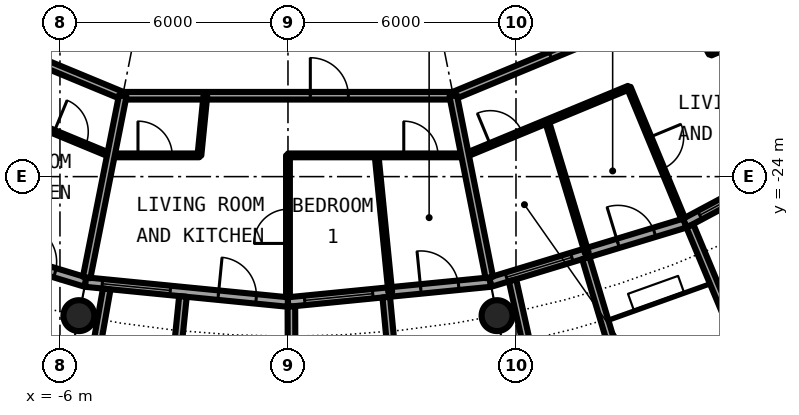
"""IFC4 building model, lengths in metres.
Left out: names, types, materials, properties, quantities, classifications, styles, units other than length and angle.
Written with IfcOpenShell. Run it as: python <this file> out.ifc"""

import sys

from ifc_helpers import new_model, si_unit, direction, frame, frame_2d, origin, origin_2d, place, context, subcontext, project, spatial, rectangle, hollow_circle, extrude, element, fill, save


model = new_model("IFC4")
c1 = context("Model", 3, precision=1e-05, world=origin(), true_north=direction((0.0, 1.0)))
c2 = subcontext(c1, "Body", "Model", "MODEL_VIEW")
j1 = project(units=[si_unit("LENGTHUNIT", "METRE"), si_unit("PLANEANGLEUNIT", "RADIAN")], contexts=[c1])
p1 = place(None, origin())
s1 = spatial("IfcSite", under=j1, at=p1, CompositionType="ELEMENT")
p2 = place(p1, origin())
s2 = spatial("IfcBuilding", under=s1, at=p2, CompositionType="ELEMENT")
p3 = place(p2, frame((0.0, 0.0, 167.7)))
s3 = spatial("IfcBuildingStorey", under=s2, at=p3, CompositionType="ELEMENT", Elevation=167.7)
for number, where, z_axis, x_axis in (
    (1, (-5.501, -27.658, 0.0), (0.0, 0.0, 1.0), (1.0, 0.0, 0.0)),
    (2, (5.501, -27.658, 0.0), (0.0, 0.0, 1.0), (1.0, 0.0, 0.0)),
):
    element("IfcColumn", number, at=place(p3, frame(where, z_axis=z_axis, x_axis=x_axis)), inside=s3, PredefinedType="COLUMN", context=c2, shape_type="SweptSolid", body=[
        extrude(hollow_circle(Radius=0.406, WallThickness=0.04, at=origin_2d()), origin(), (0.0, 0.0, 1.0), 3.05),
    ])
p4 = place(p3, frame((-10.447, -25.222, 0.0), z_axis=(0.0, 0.0, 1.0), x_axis=(0.956965678721, -0.290201119486, 0.0)))
e3 = element("IfcWall", 3, at=p4, inside=s3, PredefinedType="SOLIDWALL", context=c2, shape_type="SweptSolid", body=[
    extrude(rectangle(XDim=5.351, YDim=0.25, at=frame_2d((2.676, 0.0))), origin(), (0.0, 0.0, 1.0), 2.7),
])
p5 = place(p4, frame((0.441, 0.0, 0.3)))
e4 = element("IfcOpeningElement", 4, at=p5, cuts=e3, PredefinedType="OPENING", context=c2, shape_type="SweptSolid", body=[
    extrude(rectangle(XDim=1.8, YDim=2.1, at=frame_2d((0.9, 1.05))), frame((0.0, 0.135, 0.0), z_axis=(0.0, -1.0, 0.0), x_axis=(1.0, 0.0, 0.0)), (0.0, 0.0, 1.0), 0.27),
])
p6 = place(p4, frame((3.51, 0.0, 0.0)))
e5 = element("IfcOpeningElement", 5, at=p6, cuts=e3, PredefinedType="OPENING", context=c2, shape_type="SweptSolid", body=[
    extrude(rectangle(XDim=1.0, YDim=2.2, at=frame_2d((0.5, 1.1))), frame((0.0, 0.135, 0.0), z_axis=(0.0, -1.0, 0.0), x_axis=(1.0, 0.0, 0.0)), (0.0, 0.0, 1.0), 0.27),
])
p7 = place(p3, frame((-5.326, -26.775, 0.0), z_axis=(0.0, 0.0, 1.0), x_axis=(0.995173996315, -0.098126026407, 0.0)))
e6 = element("IfcWall", 6, at=p7, inside=s3, PredefinedType="SOLIDWALL", context=c2, shape_type="SweptSolid", body=[
    extrude(rectangle(XDim=5.352, YDim=0.25, at=frame_2d((2.676, 0.0))), origin(), (0.0, 0.0, 1.0), 2.7),
])
p8 = place(p7, frame((0.441, 0.0, 0.3)))
e7 = element("IfcOpeningElement", 7, at=p8, cuts=e6, PredefinedType="OPENING", context=c2, shape_type="SweptSolid", body=[
    extrude(rectangle(XDim=1.8, YDim=2.1, at=frame_2d((0.9, 1.05))), frame((0.0, 0.135, 0.0), z_axis=(0.0, -1.0, 0.0), x_axis=(1.0, 0.0, 0.0)), (0.0, 0.0, 1.0), 0.27),
])
p9 = place(p7, frame((3.51, 0.0, 0.0)))
e8 = element("IfcOpeningElement", 8, at=p9, cuts=e6, PredefinedType="OPENING", context=c2, shape_type="SweptSolid", body=[
    extrude(rectangle(XDim=1.0, YDim=2.2, at=frame_2d((0.5, 1.1))), frame((0.0, 0.135, 0.0), z_axis=(0.0, -1.0, 0.0), x_axis=(1.0, 0.0, 0.0)), (0.0, 0.0, 1.0), 0.27),
])
p10 = place(p3, frame((-4.769, -26.956, -0.03), z_axis=(0.0, 0.0, 1.0), x_axis=(-0.174056778901, -0.984735618183, 0.0)))
e9 = element("IfcWall", 9, at=p10, inside=s3, PredefinedType="SOLIDWALL", context=c2, shape_type="SweptSolid", body=[
    extrude(rectangle(XDim=2.925, YDim=0.2, at=frame_2d((1.462, 0.0))), origin(), (0.0, 0.0, 1.0), 2.73),
])
p11 = place(p3, frame((-2.764, -27.153, -0.03), z_axis=(0.0, 0.0, 1.0), x_axis=(-0.101505487237, -0.994834979311, 0.0)))
e10 = element("IfcWall", 10, at=p11, inside=s3, PredefinedType="SOLIDWALL", context=c2, shape_type="SweptSolid", body=[
    extrude(rectangle(XDim=3.007, YDim=0.2, at=frame_2d((1.503, 0.0))), origin(), (0.0, 0.0, 1.0), 2.73),
])
p12 = place(p3, frame((0.0, -27.3, 0.0), z_axis=(0.0, 0.0, 1.0), x_axis=(0.995173996315, 0.098126026407, 0.0)))
e11 = element("IfcWall", 11, at=p12, inside=s3, PredefinedType="SOLIDWALL", context=c2, shape_type="SweptSolid", body=[
    extrude(rectangle(XDim=5.352, YDim=0.25, at=frame_2d((2.676, 0.0))), origin(), (0.0, 0.0, 1.0), 2.7),
])
p13 = place(p12, frame((0.441, 0.0, 0.3)))
e12 = element("IfcOpeningElement", 12, at=p13, cuts=e11, PredefinedType="OPENING", context=c2, shape_type="SweptSolid", body=[
    extrude(rectangle(XDim=1.8, YDim=2.1, at=frame_2d((0.9, 1.05))), frame((0.0, 0.135, 0.0), z_axis=(0.0, -1.0, 0.0), x_axis=(1.0, 0.0, 0.0)), (0.0, 0.0, 1.0), 0.27),
])
p14 = place(p12, frame((3.51, 0.0, 0.0)))
e13 = element("IfcOpeningElement", 13, at=p14, cuts=e11, PredefinedType="OPENING", context=c2, shape_type="SweptSolid", body=[
    extrude(rectangle(XDim=1.0, YDim=2.2, at=frame_2d((0.5, 1.1))), frame((0.0, 0.135, 0.0), z_axis=(0.0, -1.0, 0.0), x_axis=(1.0, 0.0, 0.0)), (0.0, 0.0, 1.0), 0.27),
])
p15 = place(p3, frame((0.09, -27.417, -0.03), z_axis=(0.0, 0.0, 1.0), x_axis=(0.00347308367, -0.999993968827, 0.0)))
e14 = element("IfcWall", 14, at=p15, inside=s3, PredefinedType="SOLIDWALL", context=c2, shape_type="SweptSolid", body=[
    extrude(rectangle(XDim=2.882, YDim=0.2, at=frame_2d((1.441, 0.0))), origin(), (0.0, 0.0, 1.0), 2.73),
])
p16 = place(p3, frame((2.586, -27.171, -0.03), z_axis=(0.0, 0.0, 1.0), x_axis=(0.094548432284, -0.995520262954, 0.0)))
e15 = element("IfcWall", 15, at=p16, inside=s3, PredefinedType="SOLIDWALL", context=c2, shape_type="SweptSolid", body=[
    extrude(rectangle(XDim=3.006, YDim=0.2, at=frame_2d((1.503, 0.0))), origin(), (0.0, 0.0, 1.0), 2.73),
])
p17 = place(p3, frame((5.326, -26.775, 0.0), z_axis=(0.0, 0.0, 1.0), x_axis=(0.956965678721, 0.290201119486, 0.0)))
e16 = element("IfcWall", 16, at=p17, inside=s3, PredefinedType="SOLIDWALL", context=c2, shape_type="SweptSolid", body=[
    extrude(rectangle(XDim=5.351, YDim=0.25, at=frame_2d((2.676, 0.0))), origin(), (0.0, 0.0, 1.0), 2.7),
])
p18 = place(p17, frame((0.441, 0.0, 0.3)))
e17 = element("IfcOpeningElement", 17, at=p18, cuts=e16, PredefinedType="OPENING", context=c2, shape_type="SweptSolid", body=[
    extrude(rectangle(XDim=1.8, YDim=2.1, at=frame_2d((0.9, 1.05))), frame((0.0, 0.135, 0.0), z_axis=(0.0, -1.0, 0.0), x_axis=(1.0, 0.0, 0.0)), (0.0, 0.0, 1.0), 0.27),
])
p19 = place(p17, frame((3.51, 0.0, 0.0)))
e18 = element("IfcOpeningElement", 18, at=p19, cuts=e16, PredefinedType="OPENING", context=c2, shape_type="SweptSolid", body=[
    extrude(rectangle(XDim=1.0, YDim=2.2, at=frame_2d((0.5, 1.1))), frame((0.0, 0.135, 0.0), z_axis=(0.0, -1.0, 0.0), x_axis=(1.0, 0.0, 0.0)), (0.0, 0.0, 1.0), 0.27),
])
p20 = place(p3, frame((5.909, -26.729, -0.03), z_axis=(0.0, 0.0, 1.0), x_axis=(0.216409053917, -0.976302781612, 0.0)))
e19 = element("IfcWall", 19, at=p20, inside=s3, PredefinedType="SOLIDWALL", context=c2, shape_type="SweptSolid", body=[
    extrude(rectangle(XDim=2.925, YDim=0.2, at=frame_2d((1.463, 0.0))), origin(), (0.0, 0.0, 1.0), 2.73),
])
p21 = place(p3, frame((7.837, -26.144, -0.03), z_axis=(0.0, 0.0, 1.0), x_axis=(0.287064767992, -0.957911174889, 0.0)))
e20 = element("IfcWall", 20, at=p21, inside=s3, PredefinedType="SOLIDWALL", context=c2, shape_type="SweptSolid", body=[
    extrude(rectangle(XDim=3.006, YDim=0.2, at=frame_2d((1.503, 0.0))), origin(), (0.0, 0.0, 1.0), 2.73),
])
p22 = place(p3, frame((10.447, -25.222, 0.0), z_axis=(0.0, 0.0, 1.0), x_axis=(0.881915646801, 0.471407246368, 0.0)))
e21 = element("IfcWall", 21, at=p22, inside=s3, PredefinedType="SOLIDWALL", context=c2, shape_type="SweptSolid", body=[
    extrude(rectangle(XDim=5.352, YDim=0.25, at=frame_2d((2.676, 0.0))), origin(), (0.0, 0.0, 1.0), 2.7),
])
p23 = place(p22, frame((0.441, 0.0, 0.3)))
e22 = element("IfcOpeningElement", 22, at=p23, cuts=e21, PredefinedType="OPENING", context=c2, shape_type="SweptSolid", body=[
    extrude(rectangle(XDim=1.8, YDim=2.1, at=frame_2d((0.9, 1.05))), frame((0.0, 0.135, 0.0), z_axis=(0.0, -1.0, 0.0), x_axis=(1.0, 0.0, 0.0)), (0.0, 0.0, 1.0), 0.27),
])
p24 = place(p22, frame((3.51, 0.0, 0.0)))
e23 = element("IfcOpeningElement", 23, at=p24, cuts=e21, PredefinedType="OPENING", context=c2, shape_type="SweptSolid", body=[
    extrude(rectangle(XDim=1.0, YDim=2.2, at=frame_2d((0.5, 1.1))), frame((0.0, 0.135, 0.0), z_axis=(0.0, -1.0, 0.0), x_axis=(1.0, 0.0, 0.0)), (0.0, 0.0, 1.0), 0.27),
])
p25 = place(p3, frame((10.575, -25.295, -0.03), z_axis=(0.0, 0.0, 1.0), x_axis=(0.385697364644, -0.922625353492, 0.0)))
e24 = element("IfcWall", 24, at=p25, inside=s3, PredefinedType="SOLIDWALL", context=c2, shape_type="SweptSolid", body=[
    extrude(rectangle(XDim=2.883, YDim=0.2, at=frame_2d((1.442, 0.0))), origin(), (0.0, 0.0, 1.0), 2.73),
])
p26 = place(p3, frame((-6.817, -22.549, 0.0), z_axis=(0.0, 0.0, 1.0), x_axis=(0.923923664861, -0.382576870068, 0.0)))
e25 = element("IfcWall", 25, at=p26, inside=s3, PredefinedType="PARTITIONING", context=c2, shape_type="SweptSolid", body=[
    extrude(rectangle(XDim=2.331, YDim=0.1, at=frame_2d((1.166, 0.0))), origin(), (0.0, 0.0, 1.0), 2.7),
])
p27 = place(p26, frame((0.716, 0.0, 0.0)))
e26 = element("IfcOpeningElement", 26, at=p27, cuts=e25, PredefinedType="OPENING", context=c2, shape_type="SweptSolid", body=[
    extrude(rectangle(XDim=0.9, YDim=2.3, at=frame_2d((0.45, 1.15))), frame((0.0, 0.06, 0.0), z_axis=(0.0, -1.0, 0.0), x_axis=(1.0, 0.0, 0.0)), (0.0, 0.0, 1.0), 0.12),
])
p28 = place(p3, frame((-4.663, -23.441, 0.0), z_axis=(0.0, 0.0, 1.0), x_axis=(1.0, 0.0, 0.0)))
e27 = element("IfcWall", 27, at=p28, inside=s3, PredefinedType="PARTITIONING", context=c2, shape_type="SweptSolid", body=[
    extrude(rectangle(XDim=2.332, YDim=0.1, at=frame_2d((1.166, 0.0))), origin(), (0.0, 0.0, 1.0), 2.7),
])
p29 = place(p28, frame((0.716, 0.0, 0.0)))
e28 = element("IfcOpeningElement", 28, at=p29, cuts=e27, PredefinedType="OPENING", context=c2, shape_type="SweptSolid", body=[
    extrude(rectangle(XDim=0.9, YDim=2.3, at=frame_2d((0.45, 1.15))), frame((0.0, 0.06, 0.0), z_axis=(0.0, -1.0, 0.0), x_axis=(1.0, 0.0, 0.0)), (0.0, 0.0, 1.0), 0.12),
])
p30 = place(p3, frame((0.0, -23.441, 0.0), z_axis=(0.0, 0.0, 1.0), x_axis=(1.0, 0.0, 0.0)))
e29 = element("IfcWall", 29, at=p30, inside=s3, PredefinedType="PARTITIONING", context=c2, shape_type="SweptSolid", body=[
    extrude(rectangle(XDim=4.663, YDim=0.1, at=frame_2d((2.332, 0.0))), origin(), (0.0, 0.0, 1.0), 2.7),
])
p31 = place(p30, frame((3.047, 0.0, 0.0)))
e30 = element("IfcOpeningElement", 30, at=p31, cuts=e29, PredefinedType="OPENING", context=c2, shape_type="SweptSolid", body=[
    extrude(rectangle(XDim=0.9, YDim=2.3, at=frame_2d((0.45, 1.15))), frame((0.0, 0.06, 0.0), z_axis=(0.0, -1.0, 0.0), x_axis=(1.0, 0.0, 0.0)), (0.0, 0.0, 1.0), 0.12),
])
p32 = place(p3, frame((4.656, -23.442, 0.0), z_axis=(0.0, 0.0, 1.0), x_axis=(0.923994503548, 0.382405749712, 0.0)))
e31 = element("IfcWall", 31, at=p32, inside=s3, PredefinedType="PARTITIONING", context=c2, shape_type="SweptSolid", body=[
    extrude(rectangle(XDim=4.663, YDim=0.1, at=frame_2d((2.331, 0.0))), origin(), (0.0, 0.0, 1.0), 2.7),
])
p33 = place(p32, frame((0.726, 0.0, 0.0)))
e32 = element("IfcOpeningElement", 32, at=p33, cuts=e31, PredefinedType="OPENING", context=c2, shape_type="SweptSolid", body=[
    extrude(rectangle(XDim=0.9, YDim=2.3, at=frame_2d((0.45, 1.15))), frame((0.0, 0.06, 0.0), z_axis=(0.0, -1.0, 0.0), x_axis=(1.0, 0.0, 0.0)), (0.0, 0.0, 1.0), 0.12),
])
p34 = place(p3, frame((11.124, -20.764, 0.0), z_axis=(0.0, 0.0, 1.0), x_axis=(0.923938991376, 0.382539854414, 0.0)))
e33 = element("IfcWall", 33, at=p34, inside=s3, PredefinedType="PARTITIONING", context=c2, shape_type="SweptSolid", body=[
    extrude(rectangle(XDim=2.331, YDim=0.1, at=frame_2d((1.166, 0.0))), origin(), (0.0, 0.0, 1.0), 2.7),
])
p35 = place(p34, frame((0.716, 0.0, 0.0)))
e34 = element("IfcOpeningElement", 34, at=p35, cuts=e33, PredefinedType="OPENING", context=c2, shape_type="SweptSolid", body=[
    extrude(rectangle(XDim=0.9, YDim=2.3, at=frame_2d((0.45, 1.15))), frame((0.0, 0.06, 0.0), z_axis=(0.0, -1.0, 0.0), x_axis=(1.0, 0.0, 0.0)), (0.0, 0.0, 1.0), 0.12),
])
p36 = place(p3, frame((-12.389, -18.542, 0.0), z_axis=(0.0, 0.0, 1.0), x_axis=(0.923867858178, -0.382711615483, 0.0)))
e35 = element("IfcWall", 35, at=p36, inside=s3, PredefinedType="PARTITIONING", context=c2, shape_type="SweptSolid", body=[
    extrude(rectangle(XDim=8.709, YDim=0.2, at=frame_2d((4.354, 0.0))), origin(), (0.0, 0.0, 1.0), 2.7),
])
p37 = place(p36, frame((2.763, 0.0, 0.0)))
e36 = element("IfcOpeningElement", 36, at=p37, cuts=e35, PredefinedType="OPENING", context=c2, shape_type="SweptSolid", body=[
    extrude(rectangle(XDim=1.0, YDim=2.3, at=frame_2d((0.5, 1.15))), frame((0.0, 0.11, 0.0), z_axis=(0.0, -1.0, 0.0), x_axis=(1.0, 0.0, 0.0)), (0.0, 0.0, 1.0), 0.22),
])
p38 = place(p3, frame((-4.351, -21.872, 0.0), z_axis=(0.0, 0.0, 1.0), x_axis=(1.0, 0.0, 0.0)))
e37 = element("IfcWall", 37, at=p38, inside=s3, PredefinedType="PARTITIONING", context=c2, shape_type="SweptSolid", body=[
    extrude(rectangle(XDim=8.702, YDim=0.2, at=frame_2d((4.351, 0.0))), origin(), (0.0, 0.0, 1.0), 2.7),
])
p39 = place(p38, frame((4.939, 0.0, 0.0)))
e38 = element("IfcOpeningElement", 38, at=p39, cuts=e37, PredefinedType="OPENING", context=c2, shape_type="SweptSolid", body=[
    extrude(rectangle(XDim=1.0, YDim=2.3, at=frame_2d((0.5, 1.15))), frame((0.0, 0.11, 0.0), z_axis=(0.0, -1.0, 0.0), x_axis=(1.0, 0.0, 0.0)), (0.0, 0.0, 1.0), 0.22),
])
p40 = place(p3, frame((4.351, -21.872, 0.0), z_axis=(0.0, 0.0, 1.0), x_axis=(0.923825356298, 0.382814199136, 0.0)))
e39 = element("IfcWall", 39, at=p40, inside=s3, PredefinedType="PARTITIONING", context=c2, shape_type="SweptSolid", body=[
    extrude(rectangle(XDim=8.704, YDim=0.2, at=frame_2d((4.352, 0.0))), origin(), (0.0, 0.0, 1.0), 2.7),
])
p41 = place(p40, frame((2.763, 0.0, 0.0)))
e40 = element("IfcOpeningElement", 40, at=p41, cuts=e39, PredefinedType="OPENING", context=c2, shape_type="SweptSolid", body=[
    extrude(rectangle(XDim=1.0, YDim=2.3, at=frame_2d((0.5, 1.15))), frame((0.0, 0.11, 0.0), z_axis=(0.0, -1.0, 0.0), x_axis=(1.0, 0.0, 0.0)), (0.0, 0.0, 1.0), 0.22),
])
p42 = place(p3, frame((-5.298, -26.654, 0.0), z_axis=(0.0, 0.0, 1.0), x_axis=(0.194931286287, 0.980816901173, 0.0)))
e41 = element("IfcWall", 41, at=p42, inside=s3, PredefinedType="PARTITIONING", context=c2, shape_type="SweptSolid", body=[
    extrude(rectangle(XDim=4.875, YDim=0.2, at=frame_2d((2.437, 0.0))), origin(), (0.0, 0.0, 1.0), 2.7),
])
p43 = place(p3, frame((-2.33, -23.441, 0.0), z_axis=(0.0, 0.0, 1.0), x_axis=(0.098951748623, 0.995092232632, 0.0)))
e42 = element("IfcWall", 42, at=p43, inside=s3, PredefinedType="PARTITIONING", context=c2, shape_type="SweptSolid", body=[
    extrude(rectangle(XDim=1.577, YDim=0.1, at=frame_2d((0.788, 0.0))), origin(), (0.0, 0.0, 1.0), 2.7),
])
p44 = place(p3, frame((0.0, -27.175, 0.0), z_axis=(0.0, 0.0, 1.0), x_axis=(0.0, 1.0, 0.0)))
e43 = element("IfcWall", 43, at=p44, inside=s3, PredefinedType="PARTITIONING", context=c2, shape_type="SweptSolid", body=[
    extrude(rectangle(XDim=3.734, YDim=0.1, at=frame_2d((1.867, 0.0))), origin(), (0.0, 0.0, 1.0), 2.7),
])
p45 = place(p44, frame((1.417, 0.0, 0.0)))
e44 = element("IfcOpeningElement", 44, at=p45, cuts=e43, PredefinedType="OPENING", context=c2, shape_type="SweptSolid", body=[
    extrude(rectangle(XDim=0.9, YDim=2.3, at=frame_2d((0.45, 1.15))), frame((0.0, 0.06, 0.0), z_axis=(0.0, -1.0, 0.0), x_axis=(1.0, 0.0, 0.0)), (0.0, 0.0, 1.0), 0.12),
])
p46 = place(p3, frame((2.332, -23.441, 0.0), z_axis=(0.0, 0.0, 1.0), x_axis=(0.099169741095, -0.995070531395, 0.0)))
e45 = element("IfcWall", 45, at=p46, inside=s3, PredefinedType="PARTITIONING", context=c2, shape_type="SweptSolid", body=[
    extrude(rectangle(XDim=3.619, YDim=0.1, at=frame_2d((1.81, 0.0))), origin(), (0.0, 0.0, 1.0), 2.7),
])
p47 = place(p3, frame((4.348, -21.873, 0.0), z_axis=(0.0, 0.0, 1.0), x_axis=(0.194931286287, -0.980816901173, 0.0)))
e46 = element("IfcWall", 46, at=p47, inside=s3, PredefinedType="PARTITIONING", context=c2, shape_type="SweptSolid", body=[
    extrude(rectangle(XDim=4.875, YDim=0.2, at=frame_2d((2.437, 0.0))), origin(), (0.0, 0.0, 1.0), 2.7),
])
p48 = place(p3, frame((6.817, -22.549, 0.0), z_axis=(0.0, 0.0, 1.0), x_axis=(0.289439829793, -0.957196210256, 0.0)))
e47 = element("IfcWall", 47, at=p48, inside=s3, PredefinedType="PARTITIONING", context=c2, shape_type="SweptSolid", body=[
    extrude(rectangle(XDim=3.618, YDim=0.1, at=frame_2d((1.809, 0.0))), origin(), (0.0, 0.0, 1.0), 2.7),
])
p49 = place(p3, frame((8.97, -21.656, 0.0), z_axis=(0.0, 0.0, 1.0), x_axis=(0.382669377748, -0.923885353999, 0.0)))
e48 = element("IfcWall", 48, at=p49, inside=s3, PredefinedType="PARTITIONING", context=c2, shape_type="SweptSolid", body=[
    extrude(rectangle(XDim=3.734, YDim=0.1, at=frame_2d((1.867, 0.0))), origin(), (0.0, 0.0, 1.0), 2.7),
])
p50 = place(p49, frame((1.417, 0.0, 0.0)))
e49 = element("IfcOpeningElement", 49, at=p50, cuts=e48, PredefinedType="OPENING", context=c2, shape_type="SweptSolid", body=[
    extrude(rectangle(XDim=0.9, YDim=2.3, at=frame_2d((0.45, 1.15))), frame((0.0, 0.06, 0.0), z_axis=(0.0, -1.0, 0.0), x_axis=(1.0, 0.0, 0.0)), (0.0, 0.0, 1.0), 0.12),
])
p51 = place(p3, frame((10.38, -19.374, 0.0), z_axis=(0.0, 0.0, 1.0), x_axis=(0.472002235476, -0.881597351236, 0.0)))
e50 = element("IfcWall", 50, at=p51, inside=s3, PredefinedType="PARTITIONING", context=c2, shape_type="SweptSolid", body=[
    extrude(rectangle(XDim=1.577, YDim=0.1, at=frame_2d((0.788, 0.0))), origin(), (0.0, 0.0, 1.0), 2.7),
])
p52 = place(p6, origin())
e51 = element("IfcDoor", 51, at=p52, inside=s3, OperationType="SINGLE_SWING_LEFT", PredefinedType="DOOR", context=c2, shape_type="SweptSolid", body=[
    extrude(rectangle(XDim=1.0, YDim=2.2, at=frame_2d((0.5, 1.1))), frame((0.0, 0.025, 0.0), z_axis=(0.0, -1.0, 0.0), x_axis=(1.0, 0.0, 0.0)), (0.0, 0.0, 1.0), 0.05),
])
fill(e5, e51)
p53 = place(p8, origin())
e52 = element("IfcWindow", 52, at=p53, inside=s3, PartitioningType="SINGLE_PANEL", PredefinedType="WINDOW", context=c2, shape_type="SweptSolid", body=[
    extrude(rectangle(XDim=1.8, YDim=2.1, at=frame_2d((0.9, 1.05))), frame((0.0, 0.03, 0.0), z_axis=(0.0, -1.0, 0.0), x_axis=(1.0, 0.0, 0.0)), (0.0, 0.0, 1.0), 0.06),
])
fill(e7, e52)
p54 = place(p9, origin())
e53 = element("IfcDoor", 53, at=p54, inside=s3, OperationType="SINGLE_SWING_LEFT", PredefinedType="DOOR", context=c2, shape_type="SweptSolid", body=[
    extrude(rectangle(XDim=1.0, YDim=2.2, at=frame_2d((0.5, 1.1))), frame((0.0, 0.025, 0.0), z_axis=(0.0, -1.0, 0.0), x_axis=(1.0, 0.0, 0.0)), (0.0, 0.0, 1.0), 0.05),
])
fill(e8, e53)
p55 = place(p13, origin())
e54 = element("IfcWindow", 54, at=p55, inside=s3, PartitioningType="SINGLE_PANEL", PredefinedType="WINDOW", context=c2, shape_type="SweptSolid", body=[
    extrude(rectangle(XDim=1.8, YDim=2.1, at=frame_2d((0.9, 1.05))), frame((0.0, 0.03, 0.0), z_axis=(0.0, -1.0, 0.0), x_axis=(1.0, 0.0, 0.0)), (0.0, 0.0, 1.0), 0.06),
])
fill(e12, e54)
p56 = place(p14, origin())
e55 = element("IfcDoor", 55, at=p56, inside=s3, OperationType="SINGLE_SWING_LEFT", PredefinedType="DOOR", context=c2, shape_type="SweptSolid", body=[
    extrude(rectangle(XDim=1.0, YDim=2.2, at=frame_2d((0.5, 1.1))), frame((0.0, 0.025, 0.0), z_axis=(0.0, -1.0, 0.0), x_axis=(1.0, 0.0, 0.0)), (0.0, 0.0, 1.0), 0.05),
])
fill(e13, e55)
p57 = place(p18, origin())
e56 = element("IfcWindow", 56, at=p57, inside=s3, PartitioningType="SINGLE_PANEL", PredefinedType="WINDOW", context=c2, shape_type="SweptSolid", body=[
    extrude(rectangle(XDim=1.8, YDim=2.1, at=frame_2d((0.9, 1.05))), frame((0.0, 0.03, 0.0), z_axis=(0.0, -1.0, 0.0), x_axis=(1.0, 0.0, 0.0)), (0.0, 0.0, 1.0), 0.06),
])
fill(e17, e56)
p58 = place(p19, origin())
e57 = element("IfcDoor", 57, at=p58, inside=s3, OperationType="SINGLE_SWING_LEFT", PredefinedType="DOOR", context=c2, shape_type="SweptSolid", body=[
    extrude(rectangle(XDim=1.0, YDim=2.2, at=frame_2d((0.5, 1.1))), frame((0.0, 0.025, 0.0), z_axis=(0.0, -1.0, 0.0), x_axis=(1.0, 0.0, 0.0)), (0.0, 0.0, 1.0), 0.05),
])
fill(e18, e57)
p59 = place(p23, origin())
e58 = element("IfcWindow", 58, at=p59, inside=s3, PartitioningType="SINGLE_PANEL", PredefinedType="WINDOW", context=c2, shape_type="SweptSolid", body=[
    extrude(rectangle(XDim=1.8, YDim=2.1, at=frame_2d((0.9, 1.05))), frame((0.0, 0.03, 0.0), z_axis=(0.0, -1.0, 0.0), x_axis=(1.0, 0.0, 0.0)), (0.0, 0.0, 1.0), 0.06),
])
fill(e22, e58)
p60 = place(p27, origin())
e59 = element("IfcDoor", 59, at=p60, inside=s3, OperationType="SINGLE_SWING_LEFT", PredefinedType="DOOR", context=c2, shape_type="SweptSolid", body=[
    extrude(rectangle(XDim=0.9, YDim=2.3, at=frame_2d((0.45, 1.15))), frame((0.0, 0.025, 0.0), z_axis=(0.0, -1.0, 0.0), x_axis=(1.0, 0.0, 0.0)), (0.0, 0.0, 1.0), 0.05),
])
fill(e26, e59)
p61 = place(p39, origin())
e60 = element("IfcDoor", 60, at=p61, inside=s3, OperationType="SINGLE_SWING_RIGHT", PredefinedType="DOOR", context=c2, shape_type="SweptSolid", body=[
    extrude(rectangle(XDim=1.0, YDim=2.3, at=frame_2d((0.5, 1.15))), frame((0.0, 0.025, 0.0), z_axis=(0.0, -1.0, 0.0), x_axis=(1.0, 0.0, 0.0)), (0.0, 0.0, 1.0), 0.05),
])
fill(e38, e60)
p62 = place(p29, origin())
e61 = element("IfcDoor", 61, at=p62, inside=s3, OperationType="SINGLE_SWING_RIGHT", PredefinedType="DOOR", context=c2, shape_type="SweptSolid", body=[
    extrude(rectangle(XDim=0.9, YDim=2.3, at=frame_2d((0.45, 1.15))), frame((0.0, 0.025, 0.0), z_axis=(0.0, -1.0, 0.0), x_axis=(1.0, 0.0, 0.0)), (0.0, 0.0, 1.0), 0.05),
])
fill(e28, e61)
p63 = place(p45, origin())
e62 = element("IfcDoor", 62, at=p63, inside=s3, OperationType="SINGLE_SWING_RIGHT", PredefinedType="DOOR", context=c2, shape_type="SweptSolid", body=[
    extrude(rectangle(XDim=0.9, YDim=2.3, at=frame_2d((0.45, 1.15))), frame((0.0, 0.025, 0.0), z_axis=(0.0, -1.0, 0.0), x_axis=(1.0, 0.0, 0.0)), (0.0, 0.0, 1.0), 0.05),
])
fill(e44, e62)
p64 = place(p31, origin())
e63 = element("IfcDoor", 63, at=p64, inside=s3, OperationType="SINGLE_SWING_RIGHT", PredefinedType="DOOR", context=c2, shape_type="SweptSolid", body=[
    extrude(rectangle(XDim=0.9, YDim=2.3, at=frame_2d((0.45, 1.15))), frame((0.0, 0.025, 0.0), z_axis=(0.0, -1.0, 0.0), x_axis=(1.0, 0.0, 0.0)), (0.0, 0.0, 1.0), 0.05),
])
fill(e30, e63)
p65 = place(p41, origin())
e64 = element("IfcDoor", 64, at=p65, inside=s3, OperationType="SINGLE_SWING_LEFT", PredefinedType="DOOR", context=c2, shape_type="SweptSolid", body=[
    extrude(rectangle(XDim=1.0, YDim=2.3, at=frame_2d((0.5, 1.15))), frame((0.0, 0.025, 0.0), z_axis=(0.0, -1.0, 0.0), x_axis=(1.0, 0.0, 0.0)), (0.0, 0.0, 1.0), 0.05),
])
fill(e40, e64)
p66 = place(p50, origin())
e65 = element("IfcDoor", 65, at=p66, inside=s3, OperationType="SINGLE_SWING_RIGHT", PredefinedType="DOOR", context=c2, shape_type="SweptSolid", body=[
    extrude(rectangle(XDim=0.9, YDim=2.3, at=frame_2d((0.45, 1.15))), frame((0.0, 0.025, 0.0), z_axis=(0.0, -1.0, 0.0), x_axis=(1.0, 0.0, 0.0)), (0.0, 0.0, 1.0), 0.05),
])
fill(e49, e65)
p67 = place(p33, origin())
e66 = element("IfcDoor", 66, at=p67, inside=s3, OperationType="SINGLE_SWING_LEFT", PredefinedType="DOOR", context=c2, shape_type="SweptSolid", body=[
    extrude(rectangle(XDim=0.9, YDim=2.3, at=frame_2d((0.45, 1.15))), frame((0.0, 0.025, 0.0), z_axis=(0.0, -1.0, 0.0), x_axis=(1.0, 0.0, 0.0)), (0.0, 0.0, 1.0), 0.05),
])
fill(e32, e66)
save(model, sys.argv[1])
